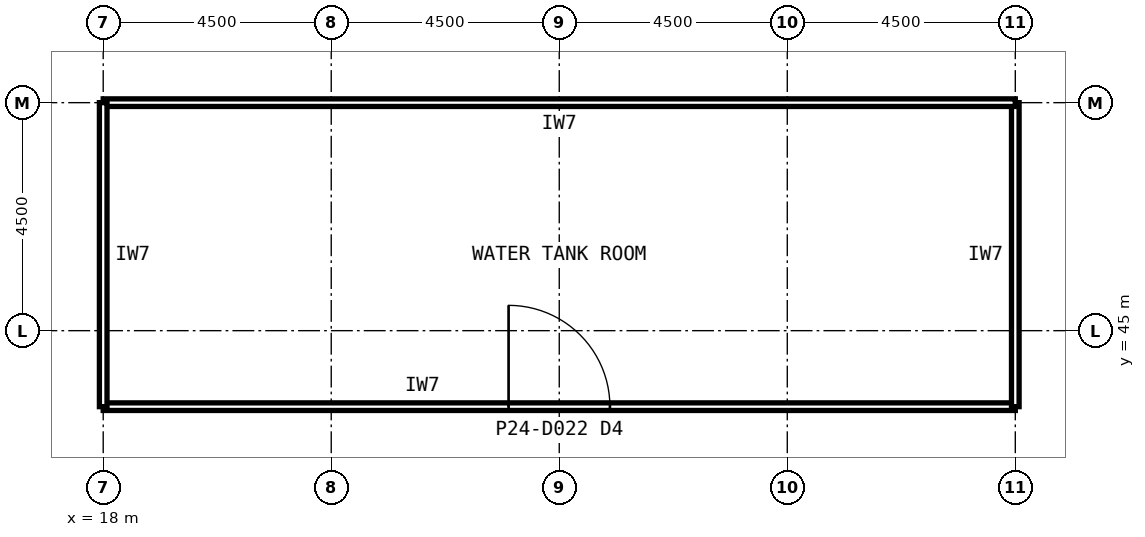
"""IFC4 building model, lengths in metres.
Left out: names, types, materials, properties, quantities, classifications, styles, units other than length and angle.
Written with IfcOpenShell. Run it as: python <this file> out.ifc"""

import sys

from ifc_helpers import new_model, si_unit, direction, frame, frame_2d, origin, place, context, subcontext, project, spatial, rectangle, extrude, element, fill, save


model = new_model("IFC4")
c1 = context("Model", 3, precision=1e-05, world=origin(), true_north=direction((0.0, 1.0)))
c2 = subcontext(c1, "Body", "Model", "MODEL_VIEW")
j1 = project(units=[si_unit("LENGTHUNIT", "METRE"), si_unit("PLANEANGLEUNIT", "RADIAN")], contexts=[c1])
p1 = place(None, origin())
s1 = spatial("IfcSite", under=j1, at=p1, CompositionType="ELEMENT")
p2 = place(p1, origin())
s2 = spatial("IfcBuilding", under=s1, at=p2, CompositionType="ELEMENT")
p3 = place(p2, frame((0.0, 0.0, 104.6)))
s3 = spatial("IfcBuildingStorey", under=s2, at=p3, CompositionType="ELEMENT", Elevation=104.6)
p4 = place(p3, frame((18.0, 43.5, 0.0), z_axis=(0.0, 0.0, 1.0), x_axis=(1.0, 0.0, 0.0)))
e1 = element("IfcWall", 1, at=p4, inside=s3, PredefinedType="PARTITIONING", context=c2, shape_type="SweptSolid", body=[
    extrude(rectangle(XDim=18.0, YDim=0.15, at=frame_2d((9.0, 0.0))), origin(), (0.0, 0.0, 1.0), 5.82),
])
p5 = place(p4, frame((8.0, 0.0, 0.0)))
e2 = element("IfcOpeningElement", 2, at=p5, cuts=e1, PredefinedType="OPENING", context=c2, shape_type="SweptSolid", body=[
    extrude(rectangle(XDim=2.0, YDim=2.4, at=frame_2d((1.0, 1.2))), frame((0.0, 0.085, 0.0), z_axis=(0.0, -1.0, 0.0), x_axis=(1.0, 0.0, 0.0)), (0.0, 0.0, 1.0), 0.17),
])
p6 = place(p3, frame((36.0, 43.5, 0.0), z_axis=(0.0, 0.0, 1.0), x_axis=(0.0, 1.0, 0.0)))
e3 = element("IfcWall", 3, at=p6, inside=s3, PredefinedType="PARTITIONING", context=c2, shape_type="SweptSolid", body=[
    extrude(rectangle(XDim=6.0, YDim=0.15, at=frame_2d((3.0, 0.0))), origin(), (0.0, 0.0, 1.0), 4.72),
])
p7 = place(p3, frame((36.0, 49.5, 0.0), z_axis=(0.0, 0.0, 1.0), x_axis=(-1.0, 0.0, 0.0)))
e4 = element("IfcWall", 4, at=p7, inside=s3, PredefinedType="PARTITIONING", context=c2, shape_type="SweptSolid", body=[
    extrude(rectangle(XDim=18.0, YDim=0.15, at=frame_2d((9.0, 0.0))), origin(), (0.0, 0.0, 1.0), 5.82),
])
p8 = place(p3, frame((18.0, 49.5, 0.0), z_axis=(0.0, 0.0, 1.0), x_axis=(0.0, -1.0, 0.0)))
e5 = element("IfcWall", 5, at=p8, inside=s3, PredefinedType="PARTITIONING", context=c2, shape_type="SweptSolid", body=[
    extrude(rectangle(XDim=6.0, YDim=0.15, at=frame_2d((3.0, 0.0))), origin(), (0.0, 0.0, 1.0), 4.72),
])
p9 = place(p5, origin())
e6 = element("IfcDoor", 6, at=p9, inside=s3, OperationType="SINGLE_SWING_LEFT", PredefinedType="DOOR", context=c2, shape_type="SweptSolid", body=[
    extrude(rectangle(XDim=2.0, YDim=2.4, at=frame_2d((1.0, 1.2))), frame((0.0, 0.025, 0.0), z_axis=(0.0, -1.0, 0.0), x_axis=(1.0, 0.0, 0.0)), (0.0, 0.0, 1.0), 0.05),
])
fill(e2, e6)
save(model, sys.argv[1])
